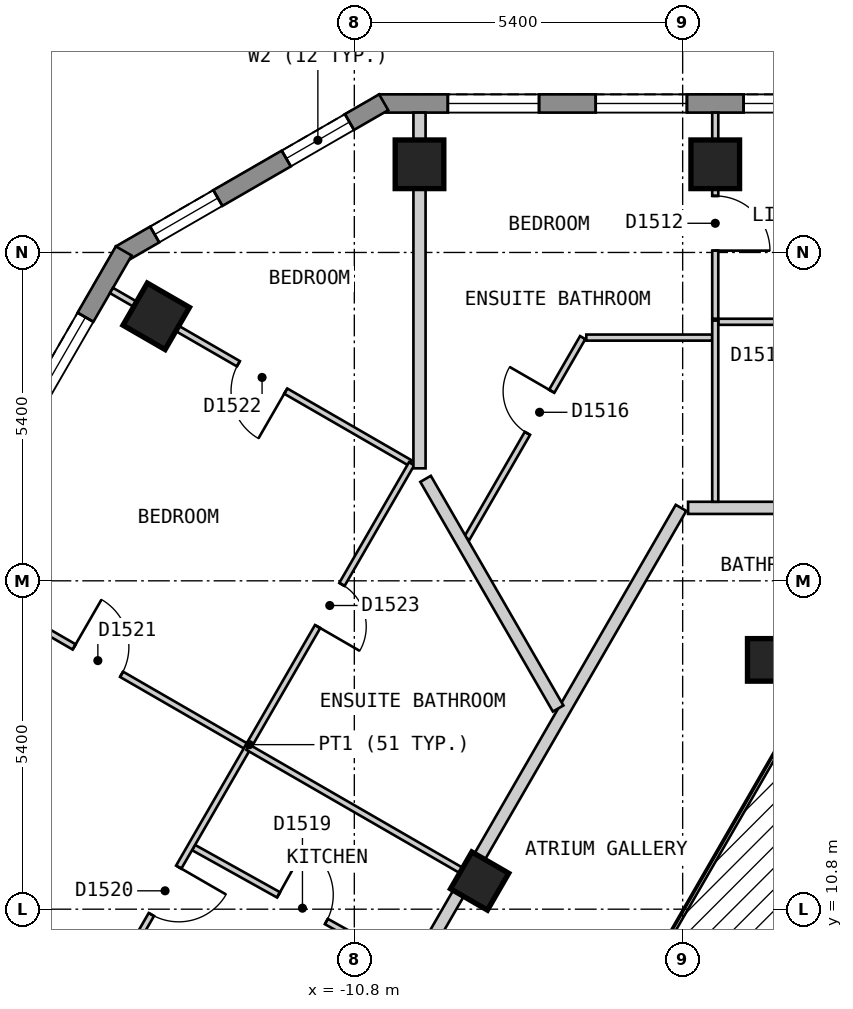
"""IFC4 building model, lengths in metres.
Left out: names, types, materials, properties, quantities, classifications, styles, units other than length and angle.
Written with IfcOpenShell. Run it as: python <this file> out.ifc"""

import sys

from ifc_helpers import new_model, si_unit, direction, frame, frame_2d, origin, origin_2d, place, context, subcontext, project, spatial, polyline, rectangle, outline, extrude, element, fill, save


model = new_model("IFC4")
c1 = context("Model", 3, precision=1e-05, world=origin(), true_north=direction((0.0, 1.0)))
c2 = subcontext(c1, "Body", "Model", "MODEL_VIEW")
j1 = project(units=[si_unit("LENGTHUNIT", "METRE"), si_unit("PLANEANGLEUNIT", "RADIAN")], contexts=[c1])
p1 = place(None, origin())
s1 = spatial("IfcSite", under=j1, at=p1, CompositionType="ELEMENT")
p2 = place(p1, origin())
s2 = spatial("IfcBuilding", under=s1, at=p2, CompositionType="ELEMENT")
p3 = place(p2, frame((0.0, 0.0, 196.2)))
s3 = spatial("IfcBuildingStorey", under=s2, at=p3, CompositionType="ELEMENT", Elevation=196.2)
for number, where, z_axis, x_axis in (
    (1, (-4.864, 23.05, 0.0), (0.0, 0.0, 1.0), (-1.0, 0.0, 0.0)),
    (2, (-9.728, 23.05, 0.0), (0.0, 0.0, 1.0), (-1.0, 0.0, 0.0)),
    (3, (-14.058, 20.55, 0.0), (0.0, 0.0, 1.0), (-0.5, -0.866, 0.0)),
):
    element("IfcColumn", number, at=place(p3, frame(where, z_axis=z_axis, x_axis=x_axis)), inside=s3, PredefinedType="COLUMN", context=c2, shape_type="SweptSolid", body=[
        extrude(rectangle(XDim=0.8, YDim=0.8, at=origin_2d()), origin(), (0.0, 0.0, 1.0), 3.0),
    ])
for number, where, z_axis, x_axis in (
    (4, (-3.984, 14.9, 0.0), (0.0, 0.0, 1.0), (1.0, 0.0, 0.0)),
    (5, (-8.739, 11.263, 0.0), (0.0, 0.0, 1.0), (-0.5, -0.866, 0.0)),
):
    element("IfcColumn", number, at=place(p3, frame(where, z_axis=z_axis, x_axis=x_axis)), inside=s3, PredefinedType="COLUMN", context=c2, shape_type="SweptSolid", body=[
        extrude(rectangle(XDim=0.7, YDim=0.7, at=origin_2d()), origin(), (0.0, 0.0, 1.0), 3.0),
    ])
p4 = place(p3, frame((10.392, 24.05, 0.0), z_axis=(0.0, 0.0, 1.0), x_axis=(-1.0, 0.0, 0.0)))
e6 = element("IfcWall", 6, at=p4, inside=s3, PredefinedType="SOLIDWALL", context=c2, shape_type="SweptSolid", body=[
    extrude(outline(polyline([(0.0, -0.15), (20.784, -0.15), (20.704, 0.15), (0.08, 0.15), (0.0, -0.15)])), origin(), (0.0, 0.0, 1.0), 2.6),
])
p5 = place(p4, frame((1.13, 0.0, 0.15)))
e7 = element("IfcOpeningElement", 7, at=p5, cuts=e6, PredefinedType="OPENING", context=c2, shape_type="SweptSolid", body=[
    extrude(rectangle(XDim=1.5, YDim=2.1, at=frame_2d((0.75, 1.05))), frame((0.0, 0.16, 0.0), z_axis=(0.0, -1.0, 0.0), x_axis=(1.0, 0.0, 0.0)), (0.0, 0.0, 1.0), 0.32),
])
p6 = place(p4, frame((3.562, 0.0, 0.15)))
e8 = element("IfcOpeningElement", 8, at=p6, cuts=e6, PredefinedType="OPENING", context=c2, shape_type="SweptSolid", body=[
    extrude(rectangle(XDim=1.5, YDim=2.1, at=frame_2d((0.75, 1.05))), frame((0.0, 0.16, 0.0), z_axis=(0.0, -1.0, 0.0), x_axis=(1.0, 0.0, 0.0)), (0.0, 0.0, 1.0), 0.32),
])
p7 = place(p4, frame((5.994, 0.0, 0.15)))
e9 = element("IfcOpeningElement", 9, at=p7, cuts=e6, PredefinedType="OPENING", context=c2, shape_type="SweptSolid", body=[
    extrude(rectangle(XDim=1.5, YDim=2.1, at=frame_2d((0.75, 1.05))), frame((0.0, 0.16, 0.0), z_axis=(0.0, -1.0, 0.0), x_axis=(1.0, 0.0, 0.0)), (0.0, 0.0, 1.0), 0.32),
])
p8 = place(p4, frame((8.426, 0.0, 0.15)))
e10 = element("IfcOpeningElement", 10, at=p8, cuts=e6, PredefinedType="OPENING", context=c2, shape_type="SweptSolid", body=[
    extrude(rectangle(XDim=1.5, YDim=2.1, at=frame_2d((0.75, 1.05))), frame((0.0, 0.16, 0.0), z_axis=(0.0, -1.0, 0.0), x_axis=(1.0, 0.0, 0.0)), (0.0, 0.0, 1.0), 0.32),
])
p9 = place(p4, frame((10.858, 0.0, 0.15)))
e11 = element("IfcOpeningElement", 11, at=p9, cuts=e6, PredefinedType="OPENING", context=c2, shape_type="SweptSolid", body=[
    extrude(rectangle(XDim=1.5, YDim=2.1, at=frame_2d((0.75, 1.05))), frame((0.0, 0.16, 0.0), z_axis=(0.0, -1.0, 0.0), x_axis=(1.0, 0.0, 0.0)), (0.0, 0.0, 1.0), 0.32),
])
p10 = place(p4, frame((13.29, 0.0, 0.15)))
e12 = element("IfcOpeningElement", 12, at=p10, cuts=e6, PredefinedType="OPENING", context=c2, shape_type="SweptSolid", body=[
    extrude(rectangle(XDim=1.5, YDim=2.1, at=frame_2d((0.75, 1.05))), frame((0.0, 0.16, 0.0), z_axis=(0.0, -1.0, 0.0), x_axis=(1.0, 0.0, 0.0)), (0.0, 0.0, 1.0), 0.32),
])
p11 = place(p4, frame((15.722, 0.0, 0.15)))
e13 = element("IfcOpeningElement", 13, at=p11, cuts=e6, PredefinedType="OPENING", context=c2, shape_type="SweptSolid", body=[
    extrude(rectangle(XDim=1.5, YDim=2.1, at=frame_2d((0.75, 1.05))), frame((0.0, 0.16, 0.0), z_axis=(0.0, -1.0, 0.0), x_axis=(1.0, 0.0, 0.0)), (0.0, 0.0, 1.0), 0.32),
])
p12 = place(p4, frame((18.154, 0.0, 0.15)))
e14 = element("IfcOpeningElement", 14, at=p12, cuts=e6, PredefinedType="OPENING", context=c2, shape_type="SweptSolid", body=[
    extrude(rectangle(XDim=1.5, YDim=2.1, at=frame_2d((0.75, 1.05))), frame((0.0, 0.16, 0.0), z_axis=(0.0, -1.0, 0.0), x_axis=(1.0, 0.0, 0.0)), (0.0, 0.0, 1.0), 0.32),
])
p13 = place(p3, frame((-10.317, 24.07, 0.0), z_axis=(0.0, 0.0, 1.0), x_axis=(-0.866022959057, -0.500004234368, 0.0)))
e15 = element("IfcWall", 15, at=p13, inside=s3, PredefinedType="SOLIDWALL", context=c2, shape_type="SweptSolid", body=[
    extrude(outline(polyline([(0.0, -0.15), (5.0, -0.15), (4.92, 0.15), (0.08, 0.15), (0.0, -0.15)])), origin(), (0.0, 0.0, 1.0), 2.6),
])
p14 = place(p13, frame((0.65, 0.0, 0.15)))
e16 = element("IfcOpeningElement", 16, at=p14, cuts=e15, PredefinedType="OPENING", context=c2, shape_type="SweptSolid", body=[
    extrude(rectangle(XDim=1.2, YDim=2.1, at=frame_2d((0.6, 1.05))), frame((0.0, 0.16, 0.0), z_axis=(0.0, -1.0, 0.0), x_axis=(1.0, 0.0, 0.0)), (0.0, 0.0, 1.0), 0.32),
])
p15 = place(p13, frame((3.149, 0.0, 0.15)))
e17 = element("IfcOpeningElement", 17, at=p15, cuts=e15, PredefinedType="OPENING", context=c2, shape_type="SweptSolid", body=[
    extrude(rectangle(XDim=1.2, YDim=2.1, at=frame_2d((0.6, 1.05))), frame((0.0, 0.16, 0.0), z_axis=(0.0, -1.0, 0.0), x_axis=(1.0, 0.0, 0.0)), (0.0, 0.0, 1.0), 0.32),
])
p16 = place(p3, frame((-14.592, 21.625, 0.0), z_axis=(0.0, 0.0, 1.0), x_axis=(-0.500010537973, -0.866019319597, 0.0)))
e18 = element("IfcWall", 18, at=p16, inside=s3, PredefinedType="SOLIDWALL", context=c2, shape_type="SweptSolid", body=[
    extrude(outline(polyline([(0.0, -0.15), (22.863, -0.15), (22.783, 0.15), (0.08, 0.15), (0.0, -0.15)])), origin(), (0.0, 0.0, 1.0), 2.6),
])
p17 = place(p16, frame((1.259, 0.0, 0.15)))
e19 = element("IfcOpeningElement", 19, at=p17, cuts=e18, PredefinedType="OPENING", context=c2, shape_type="SweptSolid", body=[
    extrude(rectangle(XDim=1.5, YDim=2.1, at=frame_2d((0.75, 1.05))), frame((0.0, 0.16, 0.0), z_axis=(0.0, -1.0, 0.0), x_axis=(1.0, 0.0, 0.0)), (0.0, 0.0, 1.0), 0.32),
])
p18 = place(p16, frame((3.952, 0.0, 0.15)))
e20 = element("IfcOpeningElement", 20, at=p18, cuts=e18, PredefinedType="OPENING", context=c2, shape_type="SweptSolid", body=[
    extrude(rectangle(XDim=1.5, YDim=2.1, at=frame_2d((0.75, 1.05))), frame((0.0, 0.16, 0.0), z_axis=(0.0, -1.0, 0.0), x_axis=(1.0, 0.0, 0.0)), (0.0, 0.0, 1.0), 0.32),
])
p19 = place(p16, frame((6.644, 0.0, 0.15)))
e21 = element("IfcOpeningElement", 21, at=p19, cuts=e18, PredefinedType="OPENING", context=c2, shape_type="SweptSolid", body=[
    extrude(rectangle(XDim=1.5, YDim=2.1, at=frame_2d((0.75, 1.05))), frame((0.0, 0.16, 0.0), z_axis=(0.0, -1.0, 0.0), x_axis=(1.0, 0.0, 0.0)), (0.0, 0.0, 1.0), 0.32),
])
p20 = place(p16, frame((9.335, 0.0, 0.15)))
e22 = element("IfcOpeningElement", 22, at=p20, cuts=e18, PredefinedType="OPENING", context=c2, shape_type="SweptSolid", body=[
    extrude(rectangle(XDim=1.5, YDim=2.1, at=frame_2d((0.75, 1.05))), frame((0.0, 0.16, 0.0), z_axis=(0.0, -1.0, 0.0), x_axis=(1.0, 0.0, 0.0)), (0.0, 0.0, 1.0), 0.32),
])
p21 = place(p16, frame((12.028, 0.0, 0.15)))
e23 = element("IfcOpeningElement", 23, at=p21, cuts=e18, PredefinedType="OPENING", context=c2, shape_type="SweptSolid", body=[
    extrude(rectangle(XDim=1.5, YDim=2.1, at=frame_2d((0.75, 1.05))), frame((0.0, 0.16, 0.0), z_axis=(0.0, -1.0, 0.0), x_axis=(1.0, 0.0, 0.0)), (0.0, 0.0, 1.0), 0.32),
])
p22 = place(p16, frame((14.72, 0.0, 0.15)))
e24 = element("IfcOpeningElement", 24, at=p22, cuts=e18, PredefinedType="OPENING", context=c2, shape_type="SweptSolid", body=[
    extrude(rectangle(XDim=1.5, YDim=2.1, at=frame_2d((0.75, 1.05))), frame((0.0, 0.16, 0.0), z_axis=(0.0, -1.0, 0.0), x_axis=(1.0, 0.0, 0.0)), (0.0, 0.0, 1.0), 0.32),
])
p23 = place(p16, frame((17.411, 0.0, 0.15)))
e25 = element("IfcOpeningElement", 25, at=p23, cuts=e18, PredefinedType="OPENING", context=c2, shape_type="SweptSolid", body=[
    extrude(rectangle(XDim=1.5, YDim=2.1, at=frame_2d((0.75, 1.05))), frame((0.0, 0.16, 0.0), z_axis=(0.0, -1.0, 0.0), x_axis=(1.0, 0.0, 0.0)), (0.0, 0.0, 1.0), 0.32),
])
p24 = place(p16, frame((20.104, 0.0, 0.15)))
e26 = element("IfcOpeningElement", 26, at=p24, cuts=e18, PredefinedType="OPENING", context=c2, shape_type="SweptSolid", body=[
    extrude(rectangle(XDim=1.5, YDim=2.1, at=frame_2d((0.75, 1.05))), frame((0.0, 0.16, 0.0), z_axis=(0.0, -1.0, 0.0), x_axis=(1.0, 0.0, 0.0)), (0.0, 0.0, 1.0), 0.32),
])
p25 = place(p3, frame((-5.311, 17.4, 0.0), z_axis=(0.0, 0.0, 1.0), x_axis=(1.0, 0.0, 0.0)))
e27 = element("IfcWall", 27, at=p25, inside=s3, PredefinedType="PARTITIONING", context=c2, shape_type="SweptSolid", body=[
    extrude(rectangle(XDim=10.737, YDim=0.2, at=frame_2d((5.369, 0.0))), origin(), (0.0, 0.0, 1.0), 2.6),
])
p26 = place(p25, frame((2.429, 0.0, 0.0)))
e28 = element("IfcOpeningElement", 28, at=p26, cuts=e27, PredefinedType="OPENING", context=c2, shape_type="SweptSolid", body=[
    extrude(rectangle(XDim=0.9, YDim=2.1, at=frame_2d((0.45, 1.05))), frame((0.0, 0.11, 0.0), z_axis=(0.0, -1.0, 0.0), x_axis=(1.0, 0.0, 0.0)), (0.0, 0.0, 1.0), 0.22),
])
p27 = place(p3, frame((-10.854, 8.0, 0.0), z_axis=(0.0, 0.0, 1.0), x_axis=(0.499997637144, 0.866026767976, 0.0)))
e29 = element("IfcWall", 29, at=p27, inside=s3, PredefinedType="PARTITIONING", context=c2, shape_type="SweptSolid", body=[
    extrude(rectangle(XDim=10.854, YDim=0.2, at=frame_2d((5.427, 0.0))), origin(), (0.0, 0.0, 1.0), 2.6),
])
p28 = place(p27, frame((0.721, 0.0, 0.0)))
e30 = element("IfcOpeningElement", 30, at=p28, cuts=e29, PredefinedType="OPENING", context=c2, shape_type="SweptSolid", body=[
    extrude(rectangle(XDim=1.0, YDim=2.1, at=frame_2d((0.5, 1.05))), frame((0.0, 0.11, 0.0), z_axis=(0.0, -1.0, 0.0), x_axis=(1.0, 0.0, 0.0)), (0.0, 0.0, 1.0), 0.22),
])
p29 = place(p3, frame((-4.864, 23.9, 0.0), z_axis=(0.0, 0.0, 1.0), x_axis=(0.0, -1.0, 0.0)))
e31 = element("IfcWall", 31, at=p29, inside=s3, PredefinedType="PARTITIONING", context=c2, shape_type="SweptSolid", body=[
    extrude(rectangle(XDim=3.39, YDim=0.1, at=frame_2d((1.695, 0.0))), origin(), (0.0, 0.0, 1.0), 2.6),
])
p30 = place(p29, frame((1.37, 0.0, 0.0)))
e32 = element("IfcOpeningElement", 32, at=p30, cuts=e31, PredefinedType="OPENING", context=c2, shape_type="SweptSolid", body=[
    extrude(rectangle(XDim=0.9, YDim=2.1, at=frame_2d((0.45, 1.05))), frame((0.0, 0.06, 0.0), z_axis=(0.0, -1.0, 0.0), x_axis=(1.0, 0.0, 0.0)), (0.0, 0.0, 1.0), 0.12),
])
p31 = place(p3, frame((-13.444, 11.814, 0.0), z_axis=(0.0, 0.0, 1.0), x_axis=(0.873653620945, -0.486548405207, 0.0)))
e33 = element("IfcWall", 33, at=p31, inside=s3, PredefinedType="PARTITIONING", context=c2, shape_type="SweptSolid", body=[
    extrude(rectangle(XDim=4.051, YDim=0.1, at=frame_2d((2.025, 0.0))), origin(), (0.0, 0.0, 1.0), 2.6),
])
p32 = place(p31, frame((1.6, 0.0, 0.0)))
e34 = element("IfcOpeningElement", 34, at=p32, cuts=e33, PredefinedType="OPENING", context=c2, shape_type="SweptSolid", body=[
    extrude(rectangle(XDim=0.9, YDim=2.1, at=frame_2d((0.45, 1.05))), frame((0.0, 0.06, 0.0), z_axis=(0.0, -1.0, 0.0), x_axis=(1.0, 0.0, 0.0)), (0.0, 0.0, 1.0), 0.12),
])
p33 = place(p3, frame((-17.486, 16.313, 0.0), z_axis=(0.0, 0.0, 1.0), x_axis=(0.866004402611, -0.500036373335, 0.0)))
e35 = element("IfcWall", 35, at=p33, inside=s3, PredefinedType="PARTITIONING", context=c2, shape_type="SweptSolid", body=[
    extrude(rectangle(XDim=5.7, YDim=0.1, at=frame_2d((2.85, 0.0))), origin(), (0.0, 0.0, 1.0), 2.6),
])
p34 = place(p33, frame((2.4, 0.0, 0.0)))
e36 = element("IfcOpeningElement", 36, at=p34, cuts=e35, PredefinedType="OPENING", context=c2, shape_type="SweptSolid", body=[
    extrude(rectangle(XDim=0.9, YDim=2.1, at=frame_2d((0.45, 1.05))), frame((0.0, 0.06, 0.0), z_axis=(0.0, -1.0, 0.0), x_axis=(1.0, 0.0, 0.0)), (0.0, 0.0, 1.0), 0.12),
])
p35 = place(p3, frame((-14.794, 20.975, 0.0), z_axis=(0.0, 0.0, 1.0), x_axis=(0.865989811779, -0.500061642096, 0.0)))
e37 = element("IfcWall", 37, at=p35, inside=s3, PredefinedType="PARTITIONING", context=c2, shape_type="SweptSolid", body=[
    extrude(rectangle(XDim=5.67, YDim=0.1, at=frame_2d((2.835, 0.0))), origin(), (0.0, 0.0, 1.0), 2.6),
])
p36 = place(p35, frame((2.41, 0.0, 0.0)))
e38 = element("IfcOpeningElement", 38, at=p36, cuts=e37, PredefinedType="OPENING", context=c2, shape_type="SweptSolid", body=[
    extrude(rectangle(XDim=0.9, YDim=2.1, at=frame_2d((0.45, 1.05))), frame((0.0, 0.06, 0.0), z_axis=(0.0, -1.0, 0.0), x_axis=(1.0, 0.0, 0.0)), (0.0, 0.0, 1.0), 0.12),
])
p37 = place(p3, frame((-6.985, 20.2, 0.0), z_axis=(0.0, 0.0, 1.0), x_axis=(1.0, 0.0, 0.0)))
e39 = element("IfcWall", 39, at=p37, inside=s3, PredefinedType="PARTITIONING", context=c2, shape_type="SweptSolid", body=[
    extrude(rectangle(XDim=2.071, YDim=0.1, at=frame_2d((1.036, 0.0))), origin(), (0.0, 0.0, 1.0), 2.6),
])
p38 = place(p3, frame((-4.814, 20.46, 0.0), z_axis=(0.0, 0.0, 1.0), x_axis=(1.0, 0.0, 0.0)))
e40 = element("IfcWall", 40, at=p38, inside=s3, PredefinedType="PARTITIONING", context=c2, shape_type="SweptSolid", body=[
    extrude(rectangle(XDim=3.111, YDim=0.1, at=frame_2d((1.556, 0.0))), origin(), (0.0, 0.0, 1.0), 2.6),
])
p39 = place(p3, frame((-8.949, 16.9, 0.0), z_axis=(0.0, 0.0, 1.0), x_axis=(0.499949850951, 0.866054355415, 0.0)))
e41 = element("IfcWall", 41, at=p39, inside=s3, PredefinedType="PARTITIONING", context=c2, shape_type="SweptSolid", body=[
    extrude(rectangle(XDim=3.811, YDim=0.1, at=frame_2d((1.905, 0.0))), origin(), (0.0, 0.0, 1.0), 2.6),
])
p40 = place(p39, frame((1.992, 0.0, 0.0)))
e42 = element("IfcOpeningElement", 42, at=p40, cuts=e41, PredefinedType="OPENING", context=c2, shape_type="SweptSolid", body=[
    extrude(rectangle(XDim=0.8, YDim=2.1, at=frame_2d((0.4, 1.05))), frame((0.0, 0.06, 0.0), z_axis=(0.0, -1.0, 0.0), x_axis=(1.0, 0.0, 0.0)), (0.0, 0.0, 1.0), 0.12),
])
p41 = place(p3, frame((-15.192, 8.887, 0.0), z_axis=(0.0, 0.0, 1.0), x_axis=(0.500028204665, 0.866009119201, 0.0)))
e43 = element("IfcWall", 43, at=p41, inside=s3, PredefinedType="PARTITIONING", context=c2, shape_type="SweptSolid", body=[
    extrude(rectangle(XDim=10.667, YDim=0.1, at=frame_2d((5.334, 0.0))), origin(), (0.0, 0.0, 1.0), 2.6),
])
p42 = place(p41, frame((2.108, 0.0, 0.0)))
e44 = element("IfcOpeningElement", 44, at=p42, cuts=e43, PredefinedType="OPENING", context=c2, shape_type="SweptSolid", body=[
    extrude(rectangle(XDim=0.9, YDim=2.1, at=frame_2d((0.45, 1.05))), frame((0.0, 0.06, 0.0), z_axis=(0.0, -1.0, 0.0), x_axis=(1.0, 0.0, 0.0)), (0.0, 0.0, 1.0), 0.12),
])
p43 = place(p41, frame((7.576, 0.0, 0.0)))
e45 = element("IfcOpeningElement", 45, at=p43, cuts=e43, PredefinedType="OPENING", context=c2, shape_type="SweptSolid", body=[
    extrude(rectangle(XDim=0.8, YDim=2.1, at=frame_2d((0.4, 1.05))), frame((0.0, 0.06, 0.0), z_axis=(0.0, -1.0, 0.0), x_axis=(1.0, 0.0, 0.0)), (0.0, 0.0, 1.0), 0.12),
])
p44 = place(p3, frame((-4.864, 17.5, 0.0), z_axis=(0.0, 0.0, 1.0), x_axis=(0.0, 1.0, 0.0)))
e46 = element("IfcWall", 46, at=p44, inside=s3, PredefinedType="PARTITIONING", context=c2, shape_type="SweptSolid", body=[
    extrude(rectangle(XDim=2.98, YDim=0.1, at=frame_2d((1.49, 0.0))), origin(), (0.0, 0.0, 1.0), 2.6),
])
p45 = place(p3, frame((-9.628, 17.877, 0.0), z_axis=(0.0, 0.0, 1.0), x_axis=(0.499890461358, -0.866088636713, 0.0)))
e47 = element("IfcWall", 47, at=p45, inside=s3, PredefinedType="PARTITIONING", context=c2, shape_type="SweptSolid", body=[
    extrude(rectangle(XDim=4.361, YDim=0.2, at=frame_2d((2.18, 0.0))), origin(), (0.0, 0.0, 1.0), 2.6),
])
p46 = place(p3, frame((-20.178, 11.65, 0.0), z_axis=(0.0, 0.0, 1.0), x_axis=(0.866022950691, -0.500004248858, 0.0)))
e48 = element("IfcWall", 48, at=p46, inside=s3, PredefinedType="PARTITIONING", context=c2, shape_type="SweptSolid", body=[
    extrude(rectangle(XDim=5.7, YDim=0.2, at=frame_2d((2.85, 0.0))), origin(), (0.0, 0.0, 1.0), 2.6),
])
p47 = place(p3, frame((-9.728, 18.05, 0.0), z_axis=(0.0, 0.0, 1.0), x_axis=(0.0, 1.0, 0.0)))
e49 = element("IfcWall", 49, at=p47, inside=s3, PredefinedType="PARTITIONING", context=c2, shape_type="SweptSolid", body=[
    extrude(rectangle(XDim=5.85, YDim=0.2, at=frame_2d((2.925, 0.0))), origin(), (0.0, 0.0, 1.0), 2.6),
])
p48 = place(p3, frame((-12.55, 13.463, 0.0), z_axis=(0.0, 0.0, 1.0), x_axis=(0.86606561423, -0.499930346997, 0.0)))
e50 = element("IfcWall", 50, at=p48, inside=s3, PredefinedType="PARTITIONING", context=c2, shape_type="SweptSolid", body=[
    extrude(rectangle(XDim=4.1, YDim=0.1, at=frame_2d((2.05, 0.0))), origin(), (0.0, 0.0, 1.0), 2.6),
])
p49 = place(p10, origin())
e51 = element("IfcWindow", 51, at=p49, inside=s3, PartitioningType="SINGLE_PANEL", PredefinedType="WINDOW", context=c2, shape_type="SweptSolid", body=[
    extrude(rectangle(XDim=1.5, YDim=2.1, at=frame_2d((0.75, 1.05))), frame((0.0, 0.03, 0.0), z_axis=(0.0, -1.0, 0.0), x_axis=(1.0, 0.0, 0.0)), (0.0, 0.0, 1.0), 0.06),
])
fill(e12, e51)
p50 = place(p11, origin())
e52 = element("IfcWindow", 52, at=p50, inside=s3, PartitioningType="SINGLE_PANEL", PredefinedType="WINDOW", context=c2, shape_type="SweptSolid", body=[
    extrude(rectangle(XDim=1.5, YDim=2.1, at=frame_2d((0.75, 1.05))), frame((0.0, 0.03, 0.0), z_axis=(0.0, -1.0, 0.0), x_axis=(1.0, 0.0, 0.0)), (0.0, 0.0, 1.0), 0.06),
])
fill(e13, e52)
p51 = place(p12, origin())
e53 = element("IfcWindow", 53, at=p51, inside=s3, PartitioningType="SINGLE_PANEL", PredefinedType="WINDOW", context=c2, shape_type="SweptSolid", body=[
    extrude(rectangle(XDim=1.5, YDim=2.1, at=frame_2d((0.75, 1.05))), frame((0.0, 0.03, 0.0), z_axis=(0.0, -1.0, 0.0), x_axis=(1.0, 0.0, 0.0)), (0.0, 0.0, 1.0), 0.06),
])
fill(e14, e53)
p52 = place(p14, origin())
e54 = element("IfcWindow", 54, at=p52, inside=s3, PartitioningType="SINGLE_PANEL", PredefinedType="WINDOW", context=c2, shape_type="SweptSolid", body=[
    extrude(rectangle(XDim=1.2, YDim=2.1, at=frame_2d((0.6, 1.05))), frame((0.0, 0.03, 0.0), z_axis=(0.0, -1.0, 0.0), x_axis=(1.0, 0.0, 0.0)), (0.0, 0.0, 1.0), 0.06),
])
fill(e16, e54)
p53 = place(p15, origin())
e55 = element("IfcWindow", 55, at=p53, inside=s3, PartitioningType="SINGLE_PANEL", PredefinedType="WINDOW", context=c2, shape_type="SweptSolid", body=[
    extrude(rectangle(XDim=1.2, YDim=2.1, at=frame_2d((0.6, 1.05))), frame((0.0, 0.03, 0.0), z_axis=(0.0, -1.0, 0.0), x_axis=(1.0, 0.0, 0.0)), (0.0, 0.0, 1.0), 0.06),
])
fill(e17, e55)
p54 = place(p17, origin())
e56 = element("IfcWindow", 56, at=p54, inside=s3, PartitioningType="SINGLE_PANEL", PredefinedType="WINDOW", context=c2, shape_type="SweptSolid", body=[
    extrude(rectangle(XDim=1.5, YDim=2.1, at=frame_2d((0.75, 1.05))), frame((0.0, 0.03, 0.0), z_axis=(0.0, -1.0, 0.0), x_axis=(1.0, 0.0, 0.0)), (0.0, 0.0, 1.0), 0.06),
])
fill(e19, e56)
p55 = place(p30, origin())
e57 = element("IfcDoor", 57, at=p55, inside=s3, OperationType="SINGLE_SWING_RIGHT", PredefinedType="DOOR", context=c2, shape_type="SweptSolid", body=[
    extrude(rectangle(XDim=0.9, YDim=2.1, at=frame_2d((0.45, 1.05))), frame((0.0, 0.025, 0.0), z_axis=(0.0, -1.0, 0.0), x_axis=(1.0, 0.0, 0.0)), (0.0, 0.0, 1.0), 0.05),
])
fill(e32, e57)
p56 = place(p40, origin())
e58 = element("IfcDoor", 58, at=p56, inside=s3, OperationType="SINGLE_SWING_RIGHT", PredefinedType="DOOR", context=c2, shape_type="SweptSolid", body=[
    extrude(rectangle(XDim=0.8, YDim=2.1, at=frame_2d((0.4, 1.05))), frame((0.0, 0.025, 0.0), z_axis=(0.0, -1.0, 0.0), x_axis=(1.0, 0.0, 0.0)), (0.0, 0.0, 1.0), 0.05),
])
fill(e42, e58)
p57 = place(p32, origin())
e59 = element("IfcDoor", 59, at=p57, inside=s3, OperationType="SINGLE_SWING_LEFT", PredefinedType="DOOR", context=c2, shape_type="SweptSolid", body=[
    extrude(rectangle(XDim=0.9, YDim=2.1, at=frame_2d((0.45, 1.05))), frame((0.0, 0.025, 0.0), z_axis=(0.0, -1.0, 0.0), x_axis=(1.0, 0.0, 0.0)), (0.0, 0.0, 1.0), 0.05),
])
fill(e34, e59)
p58 = place(p42, origin())
e60 = element("IfcDoor", 60, at=p58, inside=s3, OperationType="SINGLE_SWING_RIGHT", PredefinedType="DOOR", context=c2, shape_type="SweptSolid", body=[
    extrude(rectangle(XDim=0.9, YDim=2.1, at=frame_2d((0.45, 1.05))), frame((0.0, 0.025, 0.0), z_axis=(0.0, -1.0, 0.0), x_axis=(1.0, 0.0, 0.0)), (0.0, 0.0, 1.0), 0.05),
])
fill(e44, e60)
p59 = place(p34, origin())
e61 = element("IfcDoor", 61, at=p59, inside=s3, OperationType="SINGLE_SWING_LEFT", PredefinedType="DOOR", context=c2, shape_type="SweptSolid", body=[
    extrude(rectangle(XDim=0.9, YDim=2.1, at=frame_2d((0.45, 1.05))), frame((0.0, 0.025, 0.0), z_axis=(0.0, -1.0, 0.0), x_axis=(1.0, 0.0, 0.0)), (0.0, 0.0, 1.0), 0.05),
])
fill(e36, e61)
p60 = place(p36, origin())
e62 = element("IfcDoor", 62, at=p60, inside=s3, OperationType="SINGLE_SWING_RIGHT", PredefinedType="DOOR", context=c2, shape_type="SweptSolid", body=[
    extrude(rectangle(XDim=0.9, YDim=2.1, at=frame_2d((0.45, 1.05))), frame((0.0, 0.025, 0.0), z_axis=(0.0, -1.0, 0.0), x_axis=(1.0, 0.0, 0.0)), (0.0, 0.0, 1.0), 0.05),
])
fill(e38, e62)
p61 = place(p43, origin())
e63 = element("IfcDoor", 63, at=p61, inside=s3, OperationType="SINGLE_SWING_LEFT", PredefinedType="DOOR", context=c2, shape_type="SweptSolid", body=[
    extrude(rectangle(XDim=0.8, YDim=2.1, at=frame_2d((0.4, 1.05))), frame((0.0, 0.025, 0.0), z_axis=(0.0, -1.0, 0.0), x_axis=(1.0, 0.0, 0.0)), (0.0, 0.0, 1.0), 0.05),
])
fill(e45, e63)
save(model, sys.argv[1])
